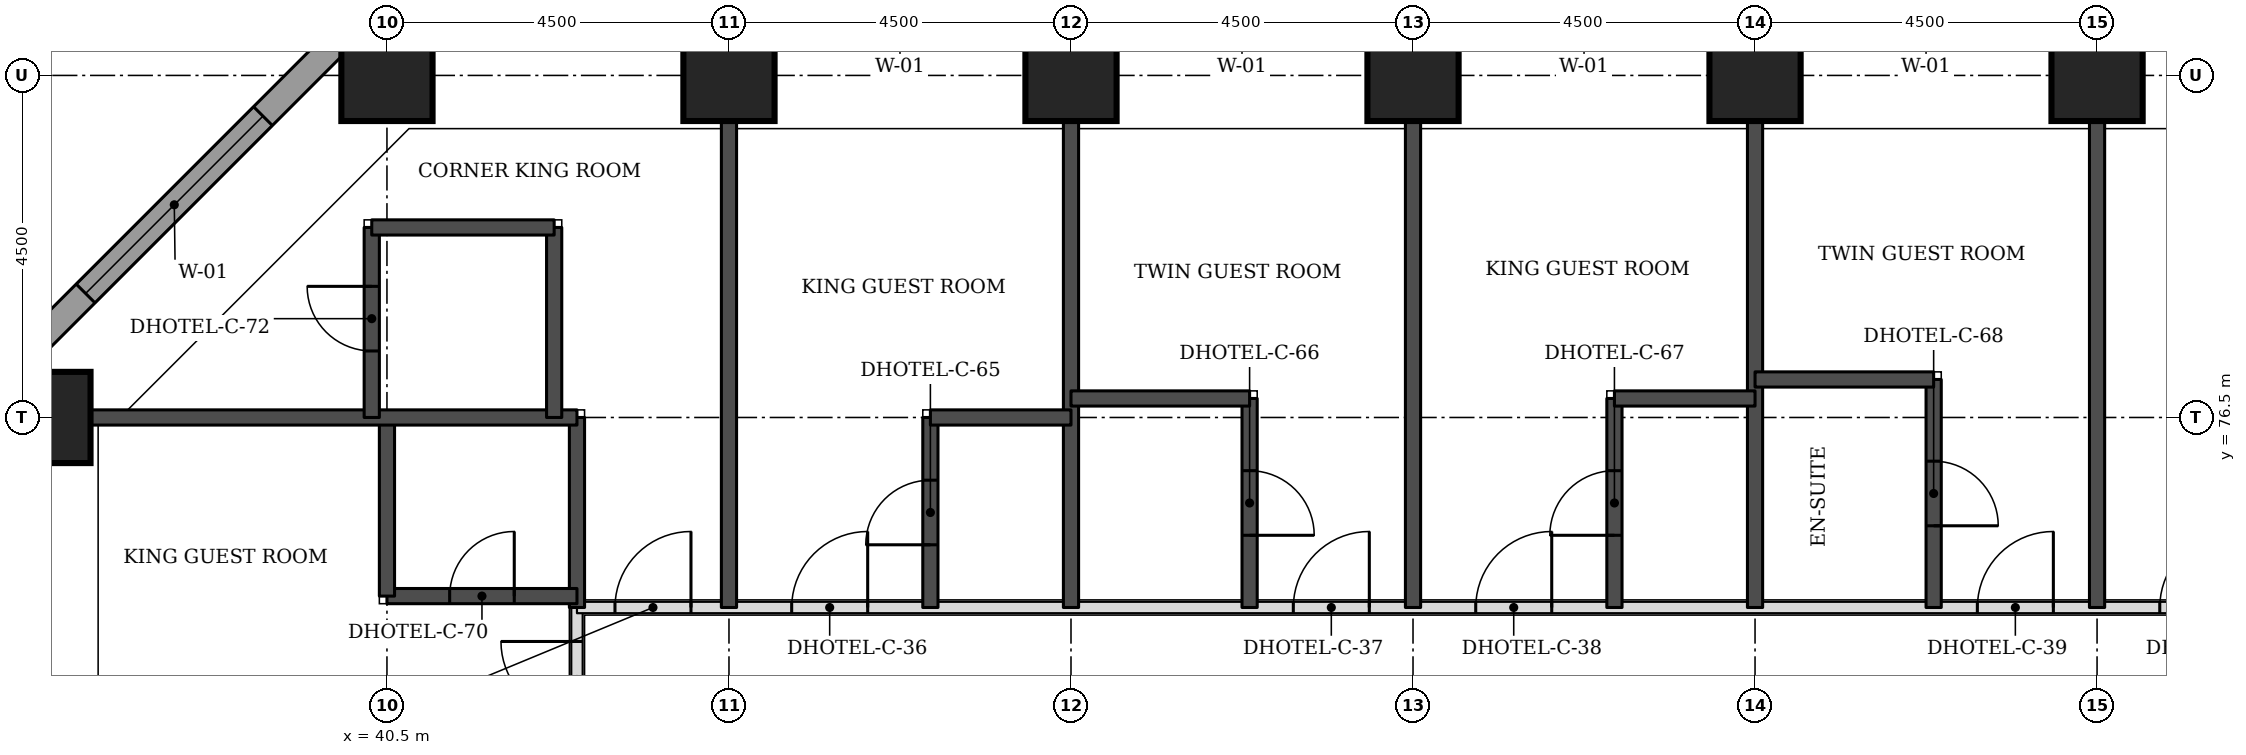
"""IFC4 building model, lengths in metres.
Left out: names, types, materials, properties, quantities, classifications, styles, units other than length and angle.
Written with IfcOpenShell. Run it as: python <this file> out.ifc"""

import sys

from ifc_helpers import new_model, si_unit, direction, frame, frame_2d, origin, origin_2d, place, context, subcontext, project, spatial, rectangle, extrude, element, fill, save


model = new_model("IFC4")
c1 = context("Model", 3, precision=1e-05, world=origin(), true_north=direction((0.0, 1.0)))
c2 = subcontext(c1, "Body", "Model", "MODEL_VIEW")
j1 = project(units=[si_unit("LENGTHUNIT", "METRE"), si_unit("PLANEANGLEUNIT", "RADIAN")], contexts=[c1])
p1 = place(None, origin())
s1 = spatial("IfcSite", under=j1, at=p1, CompositionType="ELEMENT")
p2 = place(p1, origin())
s2 = spatial("IfcBuilding", under=s1, at=p2, CompositionType="ELEMENT")
p3 = place(p2, frame((0.0, 0.0, 33.0)))
s3 = spatial("IfcBuildingStorey", under=s2, at=p3, CompositionType="ELEMENT", Elevation=33.0)
for number, where, z_axis, x_axis in (
    (1, (36.0, 76.5, 0.0), (0.0, 0.0, 1.0), (1.0, 0.0, 0.0)),
    (2, (40.5, 81.0, 0.0), (0.0, 0.0, 1.0), (1.0, 0.0, 0.0)),
    (3, (45.0, 81.0, 0.0), (0.0, 0.0, 1.0), (1.0, 0.0, 0.0)),
    (4, (49.5, 81.0, 0.0), (0.0, 0.0, 1.0), (1.0, 0.0, 0.0)),
    (5, (54.0, 81.0, 0.0), (0.0, 0.0, 1.0), (1.0, 0.0, 0.0)),
    (6, (58.5, 81.0, 0.0), (0.0, 0.0, 1.0), (1.0, 0.0, 0.0)),
    (7, (63.0, 81.0, 0.0), (0.0, 0.0, 1.0), (1.0, 0.0, 0.0)),
):
    element("IfcColumn", number, at=place(p3, frame(where, z_axis=z_axis, x_axis=x_axis)), inside=s3, PredefinedType="COLUMN", context=c2, shape_type="SweptSolid", body=[
        extrude(rectangle(XDim=1.2, YDim=1.2, at=origin_2d()), origin(), (0.0, 0.0, 1.0), 3.3),
    ])
p4 = place(p3, frame((40.23, 81.826, 0.0), z_axis=(0.0, 0.0, 1.0), x_axis=(-0.707106781187, -0.707106781187, 0.0)))
e8 = element("IfcWall", 8, at=p4, inside=s3, PredefinedType="STANDARD", context=c2, shape_type="SweptSolid", body=[
    extrude(rectangle(XDim=7.151, YDim=0.35, at=frame_2d((3.576, 0.0))), origin(), (0.0, 0.0, 1.0), 3.055),
])
p5 = place(p4, frame((1.926, 0.0, 0.8)))
e9 = element("IfcOpeningElement", 9, at=p5, cuts=e8, PredefinedType="OPENING", context=c2, shape_type="SweptSolid", body=[
    extrude(rectangle(XDim=3.3, YDim=1.5, at=frame_2d((1.65, 0.75))), frame((0.0, 0.185, 0.0), z_axis=(0.0, -1.0, 0.0), x_axis=(1.0, 0.0, 0.0)), (0.0, 0.0, 1.0), 0.37),
])
p6 = place(p3, frame((43.0, 56.0, 0.0), z_axis=(0.0, 0.0, 1.0), x_axis=(0.0, 1.0, 0.0)))
e10 = element("IfcWall", 10, at=p6, inside=s3, PredefinedType="PARTITIONING", context=c2, shape_type="SweptSolid", body=[
    extrude(rectangle(XDim=18.0, YDim=0.15, at=frame_2d((9.0, 0.0))), origin(), (0.0, 0.0, 1.0), 3.08),
])
p7 = place(p6, frame((9.775, 0.0, 0.0)))
e11 = element("IfcOpeningElement", 11, at=p7, cuts=e10, PredefinedType="OPENING", context=c2, shape_type="SweptSolid", body=[
    extrude(rectangle(XDim=1.0, YDim=2.1, at=frame_2d((0.5, 1.05))), frame((0.0, 0.085, 0.0), z_axis=(0.0, -1.0, 0.0), x_axis=(1.0, 0.0, 0.0)), (0.0, 0.0, 1.0), 0.17),
])
p8 = place(p6, frame((16.553, 0.0, 0.0)))
e12 = element("IfcOpeningElement", 12, at=p8, cuts=e10, PredefinedType="OPENING", context=c2, shape_type="SweptSolid", body=[
    extrude(rectangle(XDim=1.0, YDim=2.1, at=frame_2d((0.5, 1.05))), frame((0.0, 0.085, 0.0), z_axis=(0.0, -1.0, 0.0), x_axis=(1.0, 0.0, 0.0)), (0.0, 0.0, 1.0), 0.17),
])
p9 = place(p6, frame((3.05, 0.0, 0.0)))
e13 = element("IfcOpeningElement", 13, at=p9, cuts=e10, PredefinedType="OPENING", context=c2, shape_type="SweptSolid", body=[
    extrude(rectangle(XDim=0.9, YDim=2.1, at=frame_2d((0.45, 1.05))), frame((0.0, 0.085, 0.0), z_axis=(0.0, -1.0, 0.0), x_axis=(1.0, 0.0, 0.0)), (0.0, 0.0, 1.0), 0.17),
])
p10 = place(p3, frame((43.0, 74.0, 0.0), z_axis=(0.0, 0.0, 1.0), x_axis=(1.0, 0.0, 0.0)))
e14 = element("IfcWall", 14, at=p10, inside=s3, PredefinedType="PARTITIONING", context=c2, shape_type="SweptSolid", body=[
    extrude(rectangle(XDim=26.5, YDim=0.15, at=frame_2d((13.25, 0.0))), origin(), (0.0, 0.0, 1.0), 3.08),
])
p11 = place(p10, frame((2.825, 0.0, 0.0)))
e15 = element("IfcOpeningElement", 15, at=p11, cuts=e14, PredefinedType="OPENING", context=c2, shape_type="SweptSolid", body=[
    extrude(rectangle(XDim=1.0, YDim=2.1, at=frame_2d((0.5, 1.05))), frame((0.0, 0.085, 0.0), z_axis=(0.0, -1.0, 0.0), x_axis=(1.0, 0.0, 0.0)), (0.0, 0.0, 1.0), 0.17),
])
p12 = place(p10, frame((9.425, 0.0, 0.0)))
e16 = element("IfcOpeningElement", 16, at=p12, cuts=e14, PredefinedType="OPENING", context=c2, shape_type="SweptSolid", body=[
    extrude(rectangle(XDim=1.0, YDim=2.1, at=frame_2d((0.5, 1.05))), frame((0.0, 0.085, 0.0), z_axis=(0.0, -1.0, 0.0), x_axis=(1.0, 0.0, 0.0)), (0.0, 0.0, 1.0), 0.17),
])
p13 = place(p10, frame((11.825, 0.0, 0.0)))
e17 = element("IfcOpeningElement", 17, at=p13, cuts=e14, PredefinedType="OPENING", context=c2, shape_type="SweptSolid", body=[
    extrude(rectangle(XDim=1.0, YDim=2.1, at=frame_2d((0.5, 1.05))), frame((0.0, 0.085, 0.0), z_axis=(0.0, -1.0, 0.0), x_axis=(1.0, 0.0, 0.0)), (0.0, 0.0, 1.0), 0.17),
])
p14 = place(p10, frame((18.425, 0.0, 0.0)))
e18 = element("IfcOpeningElement", 18, at=p14, cuts=e14, PredefinedType="OPENING", context=c2, shape_type="SweptSolid", body=[
    extrude(rectangle(XDim=1.0, YDim=2.1, at=frame_2d((0.5, 1.05))), frame((0.0, 0.085, 0.0), z_axis=(0.0, -1.0, 0.0), x_axis=(1.0, 0.0, 0.0)), (0.0, 0.0, 1.0), 0.17),
])
p15 = place(p10, frame((20.825, 0.0, 0.0)))
e19 = element("IfcOpeningElement", 19, at=p15, cuts=e14, PredefinedType="OPENING", context=c2, shape_type="SweptSolid", body=[
    extrude(rectangle(XDim=1.0, YDim=2.1, at=frame_2d((0.5, 1.05))), frame((0.0, 0.085, 0.0), z_axis=(0.0, -1.0, 0.0), x_axis=(1.0, 0.0, 0.0)), (0.0, 0.0, 1.0), 0.17),
])
p16 = place(p10, frame((0.5, 0.0, 0.0)))
e20 = element("IfcOpeningElement", 20, at=p16, cuts=e14, PredefinedType="OPENING", context=c2, shape_type="SweptSolid", body=[
    extrude(rectangle(XDim=1.0, YDim=2.1, at=frame_2d((0.5, 1.05))), frame((0.0, 0.085, 0.0), z_axis=(0.0, -1.0, 0.0), x_axis=(1.0, 0.0, 0.0)), (0.0, 0.0, 1.0), 0.17),
])
p17 = place(p10, frame((25.0, 0.0, 0.0)))
e21 = element("IfcOpeningElement", 21, at=p17, cuts=e14, PredefinedType="OPENING", context=c2, shape_type="SweptSolid", body=[
    extrude(rectangle(XDim=1.0, YDim=2.1, at=frame_2d((0.5, 1.05))), frame((0.0, 0.085, 0.0), z_axis=(0.0, -1.0, 0.0), x_axis=(1.0, 0.0, 0.0)), (0.0, 0.0, 1.0), 0.17),
])
p18 = place(p3, frame((43.0, 74.0, 0.0), z_axis=(0.0, 0.0, 1.0), x_axis=(0.0, 1.0, 0.0)))
e22 = element("IfcWall", 22, at=p18, inside=s3, PredefinedType="SOLIDWALL", context=c2, shape_type="SweptSolid", body=[
    extrude(rectangle(XDim=2.5, YDim=0.2, at=frame_2d((1.25, 0.0))), origin(), (0.0, 0.0, 1.0), 3.08),
])
p19 = place(p3, frame((45.0, 74.0, 0.0), z_axis=(0.0, 0.0, 1.0), x_axis=(0.0, 1.0, 0.0)))
e23 = element("IfcWall", 23, at=p19, inside=s3, PredefinedType="SOLIDWALL", context=c2, shape_type="SweptSolid", body=[
    extrude(rectangle(XDim=6.4, YDim=0.2, at=frame_2d((3.2, 0.0))), origin(), (0.0, 0.0, 1.0), 3.08),
])
p20 = place(p3, frame((47.65, 74.0, 0.0), z_axis=(0.0, 0.0, 1.0), x_axis=(0.0, 1.0, 0.0)))
e24 = element("IfcWall", 24, at=p20, inside=s3, PredefinedType="SOLIDWALL", context=c2, shape_type="SweptSolid", body=[
    extrude(rectangle(XDim=2.5, YDim=0.2, at=frame_2d((1.25, 0.0))), origin(), (0.0, 0.0, 1.0), 3.08),
])
p21 = place(p20, frame((0.825, 0.0, 0.0)))
e25 = element("IfcOpeningElement", 25, at=p21, cuts=e24, PredefinedType="OPENING", context=c2, shape_type="SweptSolid", body=[
    extrude(rectangle(XDim=0.85, YDim=2.1, at=frame_2d((0.425, 1.05))), frame((0.0, 0.11, 0.0), z_axis=(0.0, -1.0, 0.0), x_axis=(1.0, 0.0, 0.0)), (0.0, 0.0, 1.0), 0.22),
])
p22 = place(p3, frame((49.5, 74.0, 0.0), z_axis=(0.0, 0.0, 1.0), x_axis=(0.0, 1.0, 0.0)))
e26 = element("IfcWall", 26, at=p22, inside=s3, PredefinedType="SOLIDWALL", context=c2, shape_type="SweptSolid", body=[
    extrude(rectangle(XDim=6.4, YDim=0.2, at=frame_2d((3.2, 0.0))), origin(), (0.0, 0.0, 1.0), 3.08),
])
p23 = place(p3, frame((51.85, 74.0, 0.0), z_axis=(0.0, 0.0, 1.0), x_axis=(0.0, 1.0, 0.0)))
e27 = element("IfcWall", 27, at=p23, inside=s3, PredefinedType="SOLIDWALL", context=c2, shape_type="SweptSolid", body=[
    extrude(rectangle(XDim=2.75, YDim=0.2, at=frame_2d((1.375, 0.0))), origin(), (0.0, 0.0, 1.0), 3.08),
])
p24 = place(p23, frame((0.95, 0.0, 0.0)))
e28 = element("IfcOpeningElement", 28, at=p24, cuts=e27, PredefinedType="OPENING", context=c2, shape_type="SweptSolid", body=[
    extrude(rectangle(XDim=0.85, YDim=2.1, at=frame_2d((0.425, 1.05))), frame((0.0, 0.11, 0.0), z_axis=(0.0, -1.0, 0.0), x_axis=(1.0, 0.0, 0.0)), (0.0, 0.0, 1.0), 0.22),
])
p25 = place(p3, frame((54.0, 74.0, 0.0), z_axis=(0.0, 0.0, 1.0), x_axis=(0.0, 1.0, 0.0)))
e29 = element("IfcWall", 29, at=p25, inside=s3, PredefinedType="SOLIDWALL", context=c2, shape_type="SweptSolid", body=[
    extrude(rectangle(XDim=6.4, YDim=0.2, at=frame_2d((3.2, 0.0))), origin(), (0.0, 0.0, 1.0), 3.08),
])
p26 = place(p3, frame((56.65, 74.0, 0.0), z_axis=(0.0, 0.0, 1.0), x_axis=(0.0, 1.0, 0.0)))
e30 = element("IfcWall", 30, at=p26, inside=s3, PredefinedType="SOLIDWALL", context=c2, shape_type="SweptSolid", body=[
    extrude(rectangle(XDim=2.75, YDim=0.2, at=frame_2d((1.375, 0.0))), origin(), (0.0, 0.0, 1.0), 3.08),
])
p27 = place(p26, frame((0.95, 0.0, 0.0)))
e31 = element("IfcOpeningElement", 31, at=p27, cuts=e30, PredefinedType="OPENING", context=c2, shape_type="SweptSolid", body=[
    extrude(rectangle(XDim=0.85, YDim=2.1, at=frame_2d((0.425, 1.05))), frame((0.0, 0.11, 0.0), z_axis=(0.0, -1.0, 0.0), x_axis=(1.0, 0.0, 0.0)), (0.0, 0.0, 1.0), 0.22),
])
p28 = place(p3, frame((58.5, 74.0, 0.0), z_axis=(0.0, 0.0, 1.0), x_axis=(0.0, 1.0, 0.0)))
e32 = element("IfcWall", 32, at=p28, inside=s3, PredefinedType="SOLIDWALL", context=c2, shape_type="SweptSolid", body=[
    extrude(rectangle(XDim=6.4, YDim=0.2, at=frame_2d((3.2, 0.0))), origin(), (0.0, 0.0, 1.0), 3.08),
])
p29 = place(p3, frame((60.85, 74.0, 0.0), z_axis=(0.0, 0.0, 1.0), x_axis=(0.0, 1.0, 0.0)))
e33 = element("IfcWall", 33, at=p29, inside=s3, PredefinedType="SOLIDWALL", context=c2, shape_type="SweptSolid", body=[
    extrude(rectangle(XDim=3.0, YDim=0.2, at=frame_2d((1.5, 0.0))), origin(), (0.0, 0.0, 1.0), 3.08),
])
p30 = place(p29, frame((1.075, 0.0, 0.0)))
e34 = element("IfcOpeningElement", 34, at=p30, cuts=e33, PredefinedType="OPENING", context=c2, shape_type="SweptSolid", body=[
    extrude(rectangle(XDim=0.85, YDim=2.1, at=frame_2d((0.425, 1.05))), frame((0.0, 0.11, 0.0), z_axis=(0.0, -1.0, 0.0), x_axis=(1.0, 0.0, 0.0)), (0.0, 0.0, 1.0), 0.22),
])
p31 = place(p3, frame((63.0, 74.0, 0.0), z_axis=(0.0, 0.0, 1.0), x_axis=(0.0, 1.0, 0.0)))
e35 = element("IfcWall", 35, at=p31, inside=s3, PredefinedType="SOLIDWALL", context=c2, shape_type="SweptSolid", body=[
    extrude(rectangle(XDim=6.4, YDim=0.2, at=frame_2d((3.2, 0.0))), origin(), (0.0, 0.0, 1.0), 3.08),
])
p32 = place(p3, frame((40.5, 74.15, 0.0), z_axis=(0.0, 0.0, 1.0), x_axis=(1.0, 0.0, 0.0)))
e36 = element("IfcWall", 36, at=p32, inside=s3, PredefinedType="SOLIDWALL", context=c2, shape_type="SweptSolid", body=[
    extrude(rectangle(XDim=2.5, YDim=0.2, at=frame_2d((1.25, 0.0))), origin(), (0.0, 0.0, 1.0), 3.08),
])
p33 = place(p32, frame((0.825, 0.0, 0.0)))
e37 = element("IfcOpeningElement", 37, at=p33, cuts=e36, PredefinedType="OPENING", context=c2, shape_type="SweptSolid", body=[
    extrude(rectangle(XDim=0.85, YDim=2.1, at=frame_2d((0.425, 1.05))), frame((0.0, 0.11, 0.0), z_axis=(0.0, -1.0, 0.0), x_axis=(1.0, 0.0, 0.0)), (0.0, 0.0, 1.0), 0.22),
])
p34 = place(p3, frame((40.5, 74.15, 0.0), z_axis=(0.0, 0.0, 1.0), x_axis=(0.0, 1.0, 0.0)))
e38 = element("IfcWall", 38, at=p34, inside=s3, PredefinedType="SOLIDWALL", context=c2, shape_type="SweptSolid", body=[
    extrude(rectangle(XDim=2.35, YDim=0.2, at=frame_2d((1.175, 0.0))), origin(), (0.0, 0.0, 1.0), 3.08),
])
p35 = place(p3, frame((36.6, 76.5, 0.0), z_axis=(0.0, 0.0, 1.0), x_axis=(1.0, 0.0, 0.0)))
e39 = element("IfcWall", 39, at=p35, inside=s3, PredefinedType="SOLIDWALL", context=c2, shape_type="SweptSolid", body=[
    extrude(rectangle(XDim=6.4, YDim=0.2, at=frame_2d((3.2, 0.0))), origin(), (0.0, 0.0, 1.0), 3.08),
])
p36 = place(p3, frame((40.3, 76.5, 0.0), z_axis=(0.0, 0.0, 1.0), x_axis=(0.0, 1.0, 0.0)))
e40 = element("IfcWall", 40, at=p36, inside=s3, PredefinedType="SOLIDWALL", context=c2, shape_type="SweptSolid", body=[
    extrude(rectangle(XDim=2.5, YDim=0.2, at=frame_2d((1.25, 0.0))), origin(), (0.0, 0.0, 1.0), 3.08),
])
p37 = place(p36, frame((0.875, 0.0, 0.0)))
e41 = element("IfcOpeningElement", 41, at=p37, cuts=e40, PredefinedType="OPENING", context=c2, shape_type="SweptSolid", body=[
    extrude(rectangle(XDim=0.85, YDim=2.1, at=frame_2d((0.425, 1.05))), frame((0.0, 0.11, 0.0), z_axis=(0.0, -1.0, 0.0), x_axis=(1.0, 0.0, 0.0)), (0.0, 0.0, 1.0), 0.22),
])
p38 = place(p3, frame((42.7, 76.5, 0.0), z_axis=(0.0, 0.0, 1.0), x_axis=(0.0, 1.0, 0.0)))
e42 = element("IfcWall", 42, at=p38, inside=s3, PredefinedType="SOLIDWALL", context=c2, shape_type="SweptSolid", body=[
    extrude(rectangle(XDim=2.5, YDim=0.2, at=frame_2d((1.25, 0.0))), origin(), (0.0, 0.0, 1.0), 3.08),
])
p39 = place(p3, frame((47.65, 76.5, 0.0), z_axis=(0.0, 0.0, 1.0), x_axis=(1.0, 0.0, 0.0)))
e43 = element("IfcWall", 43, at=p39, inside=s3, PredefinedType="SOLIDWALL", context=c2, shape_type="SweptSolid", body=[
    extrude(rectangle(XDim=1.85, YDim=0.2, at=frame_2d((0.925, 0.0))), origin(), (0.0, 0.0, 1.0), 3.08),
])
p40 = place(p3, frame((49.5, 76.75, 0.0), z_axis=(0.0, 0.0, 1.0), x_axis=(1.0, 0.0, 0.0)))
e44 = element("IfcWall", 44, at=p40, inside=s3, PredefinedType="SOLIDWALL", context=c2, shape_type="SweptSolid", body=[
    extrude(rectangle(XDim=2.35, YDim=0.2, at=frame_2d((1.175, 0.0))), origin(), (0.0, 0.0, 1.0), 3.08),
])
p41 = place(p3, frame((56.65, 76.75, 0.0), z_axis=(0.0, 0.0, 1.0), x_axis=(1.0, 0.0, 0.0)))
e45 = element("IfcWall", 45, at=p41, inside=s3, PredefinedType="SOLIDWALL", context=c2, shape_type="SweptSolid", body=[
    extrude(rectangle(XDim=1.85, YDim=0.2, at=frame_2d((0.925, 0.0))), origin(), (0.0, 0.0, 1.0), 3.08),
])
p42 = place(p3, frame((58.5, 77.0, 0.0), z_axis=(0.0, 0.0, 1.0), x_axis=(1.0, 0.0, 0.0)))
e46 = element("IfcWall", 46, at=p42, inside=s3, PredefinedType="SOLIDWALL", context=c2, shape_type="SweptSolid", body=[
    extrude(rectangle(XDim=2.35, YDim=0.2, at=frame_2d((1.175, 0.0))), origin(), (0.0, 0.0, 1.0), 3.08),
])
p43 = place(p3, frame((40.3, 79.0, 0.0), z_axis=(0.0, 0.0, 1.0), x_axis=(1.0, 0.0, 0.0)))
e47 = element("IfcWall", 47, at=p43, inside=s3, PredefinedType="SOLIDWALL", context=c2, shape_type="SweptSolid", body=[
    extrude(rectangle(XDim=2.4, YDim=0.2, at=frame_2d((1.2, 0.0))), origin(), (0.0, 0.0, 1.0), 3.08),
])
p44 = place(p5, origin())
e48 = element("IfcWindow", 48, at=p44, inside=s3, PartitioningType="SINGLE_PANEL", PredefinedType="WINDOW", context=c2, shape_type="SweptSolid", body=[
    extrude(rectangle(XDim=3.3, YDim=1.5, at=frame_2d((1.65, 0.75))), frame((0.0, 0.085, 0.0), z_axis=(0.0, -1.0, 0.0), x_axis=(1.0, 0.0, 0.0)), (0.0, 0.0, 1.0), 0.06),
])
fill(e9, e48)
p45 = place(p8, origin())
e49 = element("IfcDoor", 49, at=p45, inside=s3, OperationType="SINGLE_SWING_RIGHT", PredefinedType="DOOR", context=c2, shape_type="SweptSolid", body=[
    extrude(rectangle(XDim=1.0, YDim=2.1, at=frame_2d((0.5, 1.05))), frame((0.0, 0.025, 0.0), z_axis=(0.0, -1.0, 0.0), x_axis=(1.0, 0.0, 0.0)), (0.0, 0.0, 1.0), 0.05),
])
fill(e12, e49)
p46 = place(p33, origin())
e50 = element("IfcDoor", 50, at=p46, inside=s3, OperationType="SINGLE_SWING_RIGHT", PredefinedType="DOOR", context=c2, shape_type="SweptSolid", body=[
    extrude(rectangle(XDim=0.85, YDim=2.1, at=frame_2d((0.425, 1.05))), frame((0.0, 0.025, 0.0), z_axis=(0.0, -1.0, 0.0), x_axis=(1.0, 0.0, 0.0)), (0.0, 0.0, 1.0), 0.05),
])
fill(e37, e50)
p47 = place(p11, origin())
e51 = element("IfcDoor", 51, at=p47, inside=s3, OperationType="SINGLE_SWING_RIGHT", PredefinedType="DOOR", context=c2, shape_type="SweptSolid", body=[
    extrude(rectangle(XDim=1.0, YDim=2.1, at=frame_2d((0.5, 1.05))), frame((0.0, 0.025, 0.0), z_axis=(0.0, -1.0, 0.0), x_axis=(1.0, 0.0, 0.0)), (0.0, 0.0, 1.0), 0.05),
])
fill(e15, e51)
p48 = place(p21, origin())
e52 = element("IfcDoor", 52, at=p48, inside=s3, OperationType="SINGLE_SWING_LEFT", PredefinedType="DOOR", context=c2, shape_type="SweptSolid", body=[
    extrude(rectangle(XDim=0.85, YDim=2.1, at=frame_2d((0.425, 1.05))), frame((0.0, 0.025, 0.0), z_axis=(0.0, -1.0, 0.0), x_axis=(1.0, 0.0, 0.0)), (0.0, 0.0, 1.0), 0.05),
])
fill(e25, e52)
p49 = place(p12, origin())
e53 = element("IfcDoor", 53, at=p49, inside=s3, OperationType="SINGLE_SWING_RIGHT", PredefinedType="DOOR", context=c2, shape_type="SweptSolid", body=[
    extrude(rectangle(XDim=1.0, YDim=2.1, at=frame_2d((0.5, 1.05))), frame((0.0, 0.025, 0.0), z_axis=(0.0, -1.0, 0.0), x_axis=(1.0, 0.0, 0.0)), (0.0, 0.0, 1.0), 0.05),
])
fill(e16, e53)
p50 = place(p24, frame((0.85, 0.0, 0.0), z_axis=(0.0, 0.0, 1.0), x_axis=(-1.0, 0.0, 0.0)))
e54 = element("IfcDoor", 54, at=p50, inside=s3, OperationType="SINGLE_SWING_RIGHT", PredefinedType="DOOR", context=c2, shape_type="SweptSolid", body=[
    extrude(rectangle(XDim=0.85, YDim=2.1, at=frame_2d((0.425, 1.05))), frame((0.0, 0.025, 0.0), z_axis=(0.0, -1.0, 0.0), x_axis=(1.0, 0.0, 0.0)), (0.0, 0.0, 1.0), 0.05),
])
fill(e28, e54)
p51 = place(p13, origin())
e55 = element("IfcDoor", 55, at=p51, inside=s3, OperationType="SINGLE_SWING_RIGHT", PredefinedType="DOOR", context=c2, shape_type="SweptSolid", body=[
    extrude(rectangle(XDim=1.0, YDim=2.1, at=frame_2d((0.5, 1.05))), frame((0.0, 0.025, 0.0), z_axis=(0.0, -1.0, 0.0), x_axis=(1.0, 0.0, 0.0)), (0.0, 0.0, 1.0), 0.05),
])
fill(e17, e55)
p52 = place(p27, origin())
e56 = element("IfcDoor", 56, at=p52, inside=s3, OperationType="SINGLE_SWING_LEFT", PredefinedType="DOOR", context=c2, shape_type="SweptSolid", body=[
    extrude(rectangle(XDim=0.85, YDim=2.1, at=frame_2d((0.425, 1.05))), frame((0.0, 0.025, 0.0), z_axis=(0.0, -1.0, 0.0), x_axis=(1.0, 0.0, 0.0)), (0.0, 0.0, 1.0), 0.05),
])
fill(e31, e56)
p53 = place(p14, origin())
e57 = element("IfcDoor", 57, at=p53, inside=s3, OperationType="SINGLE_SWING_RIGHT", PredefinedType="DOOR", context=c2, shape_type="SweptSolid", body=[
    extrude(rectangle(XDim=1.0, YDim=2.1, at=frame_2d((0.5, 1.05))), frame((0.0, 0.025, 0.0), z_axis=(0.0, -1.0, 0.0), x_axis=(1.0, 0.0, 0.0)), (0.0, 0.0, 1.0), 0.05),
])
fill(e18, e57)
p54 = place(p30, frame((0.85, 0.0, 0.0), z_axis=(0.0, 0.0, 1.0), x_axis=(-1.0, 0.0, 0.0)))
e58 = element("IfcDoor", 58, at=p54, inside=s3, OperationType="SINGLE_SWING_RIGHT", PredefinedType="DOOR", context=c2, shape_type="SweptSolid", body=[
    extrude(rectangle(XDim=0.85, YDim=2.1, at=frame_2d((0.425, 1.05))), frame((0.0, 0.025, 0.0), z_axis=(0.0, -1.0, 0.0), x_axis=(1.0, 0.0, 0.0)), (0.0, 0.0, 1.0), 0.05),
])
fill(e34, e58)
p55 = place(p15, origin())
e59 = element("IfcDoor", 59, at=p55, inside=s3, OperationType="SINGLE_SWING_RIGHT", PredefinedType="DOOR", context=c2, shape_type="SweptSolid", body=[
    extrude(rectangle(XDim=1.0, YDim=2.1, at=frame_2d((0.5, 1.05))), frame((0.0, 0.025, 0.0), z_axis=(0.0, -1.0, 0.0), x_axis=(1.0, 0.0, 0.0)), (0.0, 0.0, 1.0), 0.05),
])
fill(e19, e59)
p56 = place(p16, origin())
e60 = element("IfcDoor", 60, at=p56, inside=s3, OperationType="SINGLE_SWING_RIGHT", PredefinedType="DOOR", context=c2, shape_type="SweptSolid", body=[
    extrude(rectangle(XDim=1.0, YDim=2.1, at=frame_2d((0.5, 1.05))), frame((0.0, 0.025, 0.0), z_axis=(0.0, -1.0, 0.0), x_axis=(1.0, 0.0, 0.0)), (0.0, 0.0, 1.0), 0.05),
])
fill(e20, e60)
p57 = place(p37, origin())
e61 = element("IfcDoor", 61, at=p57, inside=s3, OperationType="SINGLE_SWING_RIGHT", PredefinedType="DOOR", context=c2, shape_type="SweptSolid", body=[
    extrude(rectangle(XDim=0.85, YDim=2.1, at=frame_2d((0.425, 1.05))), frame((0.0, 0.025, 0.0), z_axis=(0.0, -1.0, 0.0), x_axis=(1.0, 0.0, 0.0)), (0.0, 0.0, 1.0), 0.05),
])
fill(e41, e61)
save(model, sys.argv[1])
